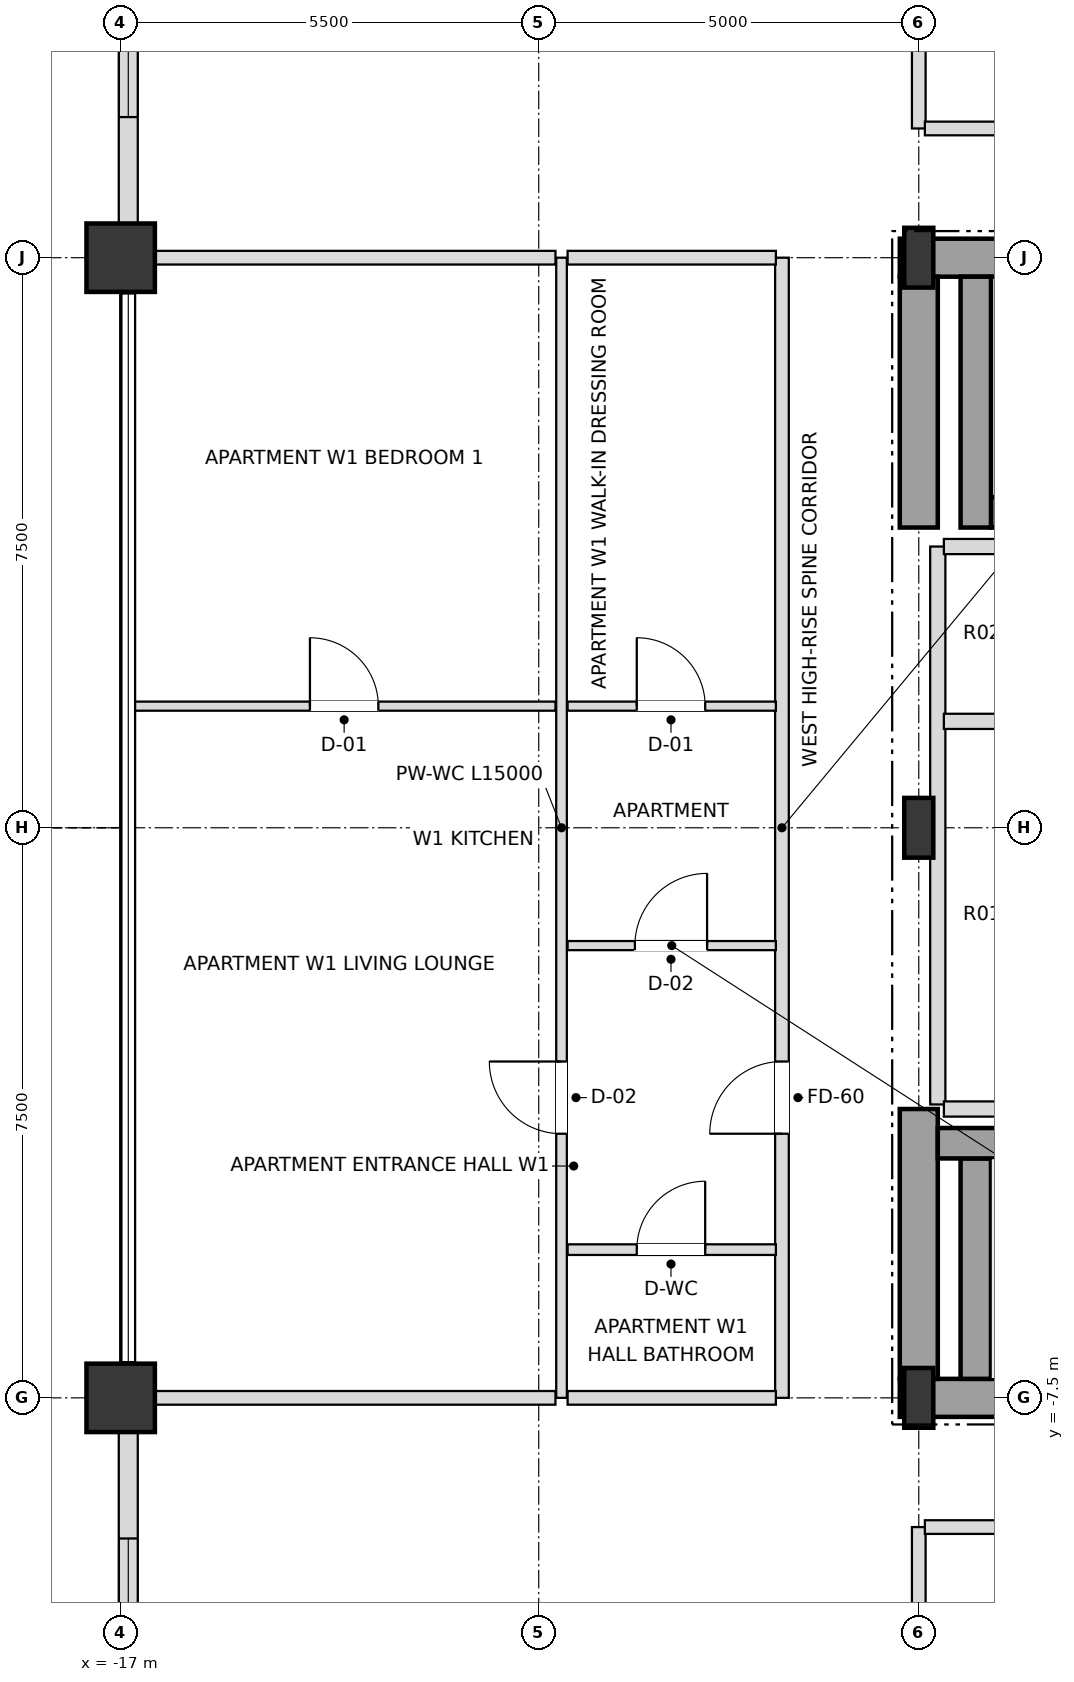
"""IFC4 building model, lengths in metres.
Left out: names, types, materials, properties, quantities, classifications, styles, units other than length and angle.
Written with IfcOpenShell. Run it as: python <this file> out.ifc"""

import sys

from ifc_helpers import new_model, si_unit, direction, frame, frame_2d, origin, origin_2d, place, context, subcontext, project, spatial, rectangle, i_section, extrude, element, fill, save


model = new_model("IFC4")
c1 = context("Model", 3, precision=1e-05, world=origin(), true_north=direction((0.0, 1.0)))
c2 = subcontext(c1, "Body", "Model", "MODEL_VIEW")
j1 = project(units=[si_unit("LENGTHUNIT", "METRE"), si_unit("PLANEANGLEUNIT", "RADIAN")], contexts=[c1])
p1 = place(None, origin())
s1 = spatial("IfcSite", under=j1, at=p1, CompositionType="ELEMENT")
p2 = place(p1, origin())
s2 = spatial("IfcBuilding", under=s1, at=p2, CompositionType="ELEMENT")
p3 = place(p2, frame((0.0, 0.0, 294.3)))
s3 = spatial("IfcBuildingStorey", under=s2, at=p3, CompositionType="ELEMENT", Elevation=294.3)
for number, where, z_axis, x_axis in (
    (1, (-6.5, -7.5, 0.0), (0.0, 0.0, 1.0), (1.0, 0.0, 0.0)),
    (2, (-6.5, 0.0, 0.0), (0.0, 0.0, 1.0), (1.0, 0.0, 0.0)),
    (3, (-6.5, 7.5, 0.0), (0.0, 0.0, 1.0), (1.0, 0.0, 0.0)),
):
    element("IfcColumn", number, at=place(p3, frame(where, z_axis=z_axis, x_axis=x_axis)), inside=s3, PredefinedType="COLUMN", context=c2, shape_type="SweptSolid", body=[
        extrude(i_section(OverallWidth=0.382, OverallDepth=0.786, WebThickness=0.02, FlangeThickness=0.033, at=origin_2d()), origin(), (0.0, 0.0, 1.0), 3.6),
    ])
for number, where, z_axis, x_axis in (
    (4, (-17.0, 7.5, 0.0), (0.0, 0.0, 1.0), (1.0, 0.0, 0.0)),
    (5, (-17.0, -7.5, 0.0), (0.0, 0.0, 1.0), (1.0, 0.0, 0.0)),
):
    element("IfcColumn", number, at=place(p3, frame(where, z_axis=z_axis, x_axis=x_axis)), inside=s3, PredefinedType="USERDEFINED", context=c2, shape_type="SweptSolid", body=[
        extrude(rectangle(XDim=0.9, YDim=0.9, at=origin_2d()), origin(), (0.0, 0.0, 1.0), 3.6),
    ])
p4 = place(p3, frame((-16.9, 12.555, 0.0), z_axis=(0.0, 0.0, 1.0), x_axis=(0.0, -1.0, 0.0)))
e6 = element("IfcWall", 6, at=p4, inside=s3, PredefinedType="SOLIDWALL", context=c2, shape_type="SweptSolid", body=[
    extrude(rectangle(XDim=4.61, YDim=0.25, at=frame_2d((2.305, 0.0))), origin(), (0.0, 0.0, 1.0), 2.748),
])
p5 = place(p4, frame((1.405, 0.0, 0.72)))
e7 = element("IfcOpeningElement", 7, at=p5, cuts=e6, PredefinedType="OPENING", context=c2, shape_type="SweptSolid", body=[
    extrude(rectangle(XDim=1.8, YDim=1.68, at=frame_2d((0.9, 0.84))), frame((0.0, 0.135, 0.0), z_axis=(0.0, -1.0, 0.0), x_axis=(1.0, 0.0, 0.0)), (0.0, 0.0, 1.0), 0.27),
])
p6 = place(p3, frame((-16.9, -7.945, 0.0), z_axis=(0.0, 0.0, 1.0), x_axis=(0.0, -1.0, 0.0)))
e8 = element("IfcWall", 8, at=p6, inside=s3, PredefinedType="SOLIDWALL", context=c2, shape_type="SweptSolid", body=[
    extrude(rectangle(XDim=4.61, YDim=0.25, at=frame_2d((2.305, 0.0))), origin(), (0.0, 0.0, 1.0), 2.748),
])
p7 = place(p6, frame((1.405, 0.0, 0.72)))
e9 = element("IfcOpeningElement", 9, at=p7, cuts=e8, PredefinedType="OPENING", context=c2, shape_type="SweptSolid", body=[
    extrude(rectangle(XDim=1.8, YDim=1.68, at=frame_2d((0.9, 0.84))), frame((0.0, 0.135, 0.0), z_axis=(0.0, -1.0, 0.0), x_axis=(1.0, 0.0, 0.0)), (0.0, 0.0, 1.0), 0.27),
])
p8 = place(p3, frame((-6.75, -7.5, 0.0), z_axis=(0.0, 0.0, 1.0), x_axis=(1.0, 0.0, 0.0)))
e10 = element("IfcWall", 10, at=p8, inside=s3, PredefinedType="SHEAR", context=c2, shape_type="SweptSolid", body=[
    extrude(rectangle(XDim=6.75, YDim=0.5, at=frame_2d((3.375, 0.0))), origin(), (0.0, 0.0, 1.0), 3.38),
])
p9 = place(p3, frame((-6.75, 7.5, 0.0), z_axis=(0.0, 0.0, 1.0), x_axis=(1.0, 0.0, 0.0)))
e11 = element("IfcWall", 11, at=p9, inside=s3, PredefinedType="SHEAR", context=c2, shape_type="SweptSolid", body=[
    extrude(rectangle(XDim=6.75, YDim=0.5, at=frame_2d((3.375, 0.0))), origin(), (0.0, 0.0, 1.0), 3.38),
])
p10 = place(p9, frame((1.65, 0.0, 0.0)))
e12 = element("IfcOpeningElement", 12, at=p10, cuts=e11, PredefinedType="OPENING", context=c2, shape_type="SweptSolid", body=[
    extrude(rectangle(XDim=1.05, YDim=2.15, at=frame_2d((0.525, 1.075))), frame((0.0, 0.26, 0.0), z_axis=(0.0, -1.0, 0.0), x_axis=(1.0, 0.0, 0.0)), (0.0, 0.0, 1.0), 0.52),
])
p11 = place(p3, frame((-6.5, -7.25, 0.0), z_axis=(0.0, 0.0, 1.0), x_axis=(0.0, 1.0, 0.0)))
e13 = element("IfcWall", 13, at=p11, inside=s3, PredefinedType="SHEAR", context=c2, shape_type="SweptSolid", body=[
    extrude(rectangle(XDim=3.55, YDim=0.5, at=frame_2d((1.775, 0.0))), origin(), (0.0, 0.0, 1.0), 3.38),
])
p12 = place(p3, frame((-6.5, 3.95, 0.0), z_axis=(0.0, 0.0, 1.0), x_axis=(0.0, 1.0, 0.0)))
e14 = element("IfcWall", 14, at=p12, inside=s3, PredefinedType="SHEAR", context=c2, shape_type="SweptSolid", body=[
    extrude(rectangle(XDim=3.3, YDim=0.5, at=frame_2d((1.65, 0.0))), origin(), (0.0, 0.0, 1.0), 3.38),
])
p13 = place(p3, frame((-5.75, -7.25, 0.0), z_axis=(0.0, 0.0, 1.0), x_axis=(0.0, 1.0, 0.0)))
e15 = element("IfcWall", 15, at=p13, inside=s3, PredefinedType="SHEAR", context=c2, shape_type="SweptSolid", body=[
    extrude(rectangle(XDim=2.9, YDim=0.4, at=frame_2d((1.45, 0.0))), origin(), (0.0, 0.0, 1.0), 3.38),
])
p14 = place(p3, frame((-6.25, -4.15, 0.0), z_axis=(0.0, 0.0, 1.0), x_axis=(1.0, 0.0, 0.0)))
e16 = element("IfcWall", 16, at=p14, inside=s3, PredefinedType="SHEAR", context=c2, shape_type="SweptSolid", body=[
    extrude(rectangle(XDim=7.78, YDim=0.4, at=frame_2d((3.89, 0.0))), origin(), (0.0, 0.0, 1.0), 3.38),
])
p15 = place(p3, frame((-5.55, 4.15, 0.0), z_axis=(0.0, 0.0, 1.0), x_axis=(1.0, 0.0, 0.0)))
e17 = element("IfcWall", 17, at=p15, inside=s3, PredefinedType="SHEAR", context=c2, shape_type="SweptSolid", body=[
    extrude(rectangle(XDim=7.08, YDim=0.4, at=frame_2d((3.54, 0.0))), origin(), (0.0, 0.0, 1.0), 3.38),
])
p16 = place(p3, frame((-5.75, 3.95, 0.0), z_axis=(0.0, 0.0, 1.0), x_axis=(0.0, 1.0, 0.0)))
e18 = element("IfcWall", 18, at=p16, inside=s3, PredefinedType="SHEAR", context=c2, shape_type="SweptSolid", body=[
    extrude(rectangle(XDim=3.3, YDim=0.4, at=frame_2d((1.65, 0.0))), origin(), (0.0, 0.0, 1.0), 3.38),
])
p17 = place(p3, frame((-11.2, -7.5, 0.0), z_axis=(0.0, 0.0, 1.0), x_axis=(0.0, 1.0, 0.0)))
e19 = element("IfcWall", 19, at=p17, inside=s3, PredefinedType="PARTITIONING", context=c2, shape_type="SweptSolid", body=[
    extrude(rectangle(XDim=15.0, YDim=0.14, at=frame_2d((7.5, 0.0))), origin(), (0.0, 0.0, 1.0), 3.38),
])
p18 = place(p17, frame((3.475, 0.0, 0.0)))
e20 = element("IfcOpeningElement", 20, at=p18, cuts=e19, PredefinedType="OPENING", context=c2, shape_type="SweptSolid", body=[
    extrude(rectangle(XDim=0.95, YDim=2.1, at=frame_2d((0.475, 1.05))), frame((0.0, 0.08, 0.0), z_axis=(0.0, -1.0, 0.0), x_axis=(1.0, 0.0, 0.0)), (0.0, 0.0, 1.0), 0.16),
])
p19 = place(p3, frame((-8.3, -7.5, 0.0), z_axis=(0.0, 0.0, 1.0), x_axis=(0.0, 1.0, 0.0)))
e21 = element("IfcWall", 21, at=p19, inside=s3, PredefinedType="PARTITIONING", context=c2, shape_type="SweptSolid", body=[
    extrude(rectangle(XDim=15.0, YDim=0.18, at=frame_2d((7.5, 0.0))), origin(), (0.0, 0.0, 1.0), 3.38),
])
p20 = place(p19, frame((3.475, 0.0, 0.0)))
e22 = element("IfcOpeningElement", 22, at=p20, cuts=e21, PredefinedType="OPENING", context=c2, shape_type="SweptSolid", body=[
    extrude(rectangle(XDim=0.95, YDim=2.15, at=frame_2d((0.475, 1.075))), frame((0.0, 0.1, 0.0), z_axis=(0.0, -1.0, 0.0), x_axis=(1.0, 0.0, 0.0)), (0.0, 0.0, 1.0), 0.2),
])
for number, where, z_axis, x_axis in (
    (23, (-6.5, -19.9, 0.0), (0.0, 0.0, 1.0), (0.0, 1.0, 0.0)),
    (24, (-6.5, 9.2, 0.0), (0.0, 0.0, 1.0), (0.0, 1.0, 0.0)),
):
    element("IfcWall", number, at=place(p3, frame(where, z_axis=z_axis, x_axis=x_axis)), inside=s3, PredefinedType="PARTITIONING", context=c2, shape_type="SweptSolid", body=[
        extrude(rectangle(XDim=10.7, YDim=0.18, at=frame_2d((5.35, 0.0))), origin(), (0.0, 0.0, 1.0), 2.826),
    ])
p21 = place(p3, frame((-6.25, -3.64, 0.0), z_axis=(0.0, 0.0, 1.0), x_axis=(0.0, 1.0, 0.0)))
e25 = element("IfcWall", 25, at=p21, inside=s3, PredefinedType="SOLIDWALL", context=c2, shape_type="SweptSolid", body=[
    extrude(rectangle(XDim=7.34, YDim=0.2, at=frame_2d((3.67, 0.0))), origin(), (0.0, 0.0, 1.0), 3.38),
])
p22 = place(p3, frame((-6.42, -9.2, 0.0), z_axis=(0.0, 0.0, 1.0), x_axis=(1.0, 0.0, 0.0)))
e26 = element("IfcWall", 26, at=p22, inside=s3, PredefinedType="PARTITIONING", context=c2, shape_type="SweptSolid", body=[
    extrude(rectangle(XDim=5.19, YDim=0.18, at=frame_2d((2.595, 0.0))), origin(), (0.0, 0.0, 1.0), 3.38),
])
p23 = place(p22, frame((2.135, 0.0, 0.0)))
e27 = element("IfcOpeningElement", 27, at=p23, cuts=e26, PredefinedType="OPENING", context=c2, shape_type="SweptSolid", body=[
    extrude(rectangle(XDim=0.95, YDim=2.15, at=frame_2d((0.475, 1.075))), frame((0.0, 0.1, 0.0), z_axis=(0.0, -1.0, 0.0), x_axis=(1.0, 0.0, 0.0)), (0.0, 0.0, 1.0), 0.2),
])
p24 = place(p3, frame((-16.9, -7.5, 0.0), z_axis=(0.0, 0.0, 1.0), x_axis=(1.0, 0.0, 0.0)))
e28 = element("IfcWall", 28, at=p24, inside=s3, PredefinedType="PARTITIONING", context=c2, shape_type="SweptSolid", body=[
    extrude(rectangle(XDim=5.62, YDim=0.18, at=frame_2d((2.81, 0.0))), origin(), (0.0, 0.0, 1.0), 2.826),
])
p25 = place(p3, frame((-11.12, -7.5, 0.0), z_axis=(0.0, 0.0, 1.0), x_axis=(1.0, 0.0, 0.0)))
e29 = element("IfcWall", 29, at=p25, inside=s3, PredefinedType="PARTITIONING", context=c2, shape_type="SweptSolid", body=[
    extrude(rectangle(XDim=2.74, YDim=0.18, at=frame_2d((1.37, 0.0))), origin(), (0.0, 0.0, 1.0), 2.826),
])
p26 = place(p3, frame((-11.12, -5.55, 0.0), z_axis=(0.0, 0.0, 1.0), x_axis=(1.0, 0.0, 0.0)))
e30 = element("IfcWall", 30, at=p26, inside=s3, PredefinedType="PARTITIONING", context=c2, shape_type="SweptSolid", body=[
    extrude(rectangle(XDim=2.74, YDim=0.14, at=frame_2d((1.37, 0.0))), origin(), (0.0, 0.0, 1.0), 3.38),
])
p27 = place(p26, frame((0.91, 0.0, 0.0)))
e31 = element("IfcOpeningElement", 31, at=p27, cuts=e30, PredefinedType="OPENING", context=c2, shape_type="SweptSolid", body=[
    extrude(rectangle(XDim=0.9, YDim=2.1, at=frame_2d((0.45, 1.05))), frame((0.0, 0.08, 0.0), z_axis=(0.0, -1.0, 0.0), x_axis=(1.0, 0.0, 0.0)), (0.0, 0.0, 1.0), 0.16),
])
p28 = place(p3, frame((-6.17, -3.7, 0.0), z_axis=(0.0, 0.0, 1.0), x_axis=(1.0, 0.0, 0.0)))
e32 = element("IfcWall", 32, at=p28, inside=s3, PredefinedType="SOLIDWALL", context=c2, shape_type="SweptSolid", body=[
    extrude(rectangle(XDim=1.94, YDim=0.2, at=frame_2d((0.97, 0.0))), origin(), (0.0, 0.0, 1.0), 3.38),
])
p29 = place(p3, frame((-11.12, -1.55, 0.0), z_axis=(0.0, 0.0, 1.0), x_axis=(1.0, 0.0, 0.0)))
e33 = element("IfcWall", 33, at=p29, inside=s3, PredefinedType="PARTITIONING", context=c2, shape_type="SweptSolid", body=[
    extrude(rectangle(XDim=2.74, YDim=0.12, at=frame_2d((1.37, 0.0))), origin(), (0.0, 0.0, 1.0), 3.38),
])
p30 = place(p29, frame((0.885, 0.0, 0.0)))
e34 = element("IfcOpeningElement", 34, at=p30, cuts=e33, PredefinedType="OPENING", context=c2, shape_type="SweptSolid", body=[
    extrude(rectangle(XDim=0.95, YDim=2.1, at=frame_2d((0.475, 1.05))), frame((0.0, 0.07, 0.0), z_axis=(0.0, -1.0, 0.0), x_axis=(1.0, 0.0, 0.0)), (0.0, 0.0, 1.0), 0.14),
])
p31 = place(p3, frame((-6.17, 1.4, 0.0), z_axis=(0.0, 0.0, 1.0), x_axis=(1.0, 0.0, 0.0)))
e35 = element("IfcWall", 35, at=p31, inside=s3, PredefinedType="SOLIDWALL", context=c2, shape_type="SweptSolid", body=[
    extrude(rectangle(XDim=1.94, YDim=0.2, at=frame_2d((0.97, 0.0))), origin(), (0.0, 0.0, 1.0), 3.38),
])
p32 = place(p3, frame((-16.82, 1.6, 0.0), z_axis=(0.0, 0.0, 1.0), x_axis=(1.0, 0.0, 0.0)))
e36 = element("IfcWall", 36, at=p32, inside=s3, PredefinedType="PARTITIONING", context=c2, shape_type="SweptSolid", body=[
    extrude(rectangle(XDim=5.54, YDim=0.12, at=frame_2d((2.77, 0.0))), origin(), (0.0, 0.0, 1.0), 3.018),
])
p33 = place(p32, frame((2.31, 0.0, 0.0)))
e37 = element("IfcOpeningElement", 37, at=p33, cuts=e36, PredefinedType="OPENING", context=c2, shape_type="SweptSolid", body=[
    extrude(rectangle(XDim=0.9, YDim=2.1, at=frame_2d((0.45, 1.05))), frame((0.0, 0.07, 0.0), z_axis=(0.0, -1.0, 0.0), x_axis=(1.0, 0.0, 0.0)), (0.0, 0.0, 1.0), 0.14),
])
p34 = place(p3, frame((-11.12, 1.6, 0.0), z_axis=(0.0, 0.0, 1.0), x_axis=(1.0, 0.0, 0.0)))
e38 = element("IfcWall", 38, at=p34, inside=s3, PredefinedType="PARTITIONING", context=c2, shape_type="SweptSolid", body=[
    extrude(rectangle(XDim=2.74, YDim=0.12, at=frame_2d((1.37, 0.0))), origin(), (0.0, 0.0, 1.0), 3.38),
])
p35 = place(p34, frame((0.91, 0.0, 0.0)))
e39 = element("IfcOpeningElement", 39, at=p35, cuts=e38, PredefinedType="OPENING", context=c2, shape_type="SweptSolid", body=[
    extrude(rectangle(XDim=0.9, YDim=2.1, at=frame_2d((0.45, 1.05))), frame((0.0, 0.07, 0.0), z_axis=(0.0, -1.0, 0.0), x_axis=(1.0, 0.0, 0.0)), (0.0, 0.0, 1.0), 0.14),
])
p36 = place(p3, frame((-6.17, 3.7, 0.0), z_axis=(0.0, 0.0, 1.0), x_axis=(1.0, 0.0, 0.0)))
e40 = element("IfcWall", 40, at=p36, inside=s3, PredefinedType="SOLIDWALL", context=c2, shape_type="SweptSolid", body=[
    extrude(rectangle(XDim=1.94, YDim=0.2, at=frame_2d((0.97, 0.0))), origin(), (0.0, 0.0, 1.0), 3.38),
])
p37 = place(p3, frame((-16.9, 7.5, 0.0), z_axis=(0.0, 0.0, 1.0), x_axis=(1.0, 0.0, 0.0)))
e41 = element("IfcWall", 41, at=p37, inside=s3, PredefinedType="PARTITIONING", context=c2, shape_type="SweptSolid", body=[
    extrude(rectangle(XDim=5.62, YDim=0.18, at=frame_2d((2.81, 0.0))), origin(), (0.0, 0.0, 1.0), 2.826),
])
p38 = place(p3, frame((-11.12, 7.5, 0.0), z_axis=(0.0, 0.0, 1.0), x_axis=(1.0, 0.0, 0.0)))
e42 = element("IfcWall", 42, at=p38, inside=s3, PredefinedType="PARTITIONING", context=c2, shape_type="SweptSolid", body=[
    extrude(rectangle(XDim=2.74, YDim=0.18, at=frame_2d((1.37, 0.0))), origin(), (0.0, 0.0, 1.0), 2.826),
])
p39 = place(p3, frame((-6.42, 9.2, 0.0), z_axis=(0.0, 0.0, 1.0), x_axis=(1.0, 0.0, 0.0)))
e43 = element("IfcWall", 43, at=p39, inside=s3, PredefinedType="PARTITIONING", context=c2, shape_type="SweptSolid", body=[
    extrude(rectangle(XDim=5.19, YDim=0.18, at=frame_2d((2.595, 0.0))), origin(), (0.0, 0.0, 1.0), 3.38),
])
p40 = place(p39, frame((2.135, 0.0, 0.0)))
e44 = element("IfcOpeningElement", 44, at=p40, cuts=e43, PredefinedType="OPENING", context=c2, shape_type="SweptSolid", body=[
    extrude(rectangle(XDim=0.95, YDim=2.15, at=frame_2d((0.475, 1.075))), frame((0.0, 0.1, 0.0), z_axis=(0.0, -1.0, 0.0), x_axis=(1.0, 0.0, 0.0)), (0.0, 0.0, 1.0), 0.2),
])
p41 = place(p5, origin())
e45 = element("IfcWindow", 45, at=p41, inside=s3, PartitioningType="SINGLE_PANEL", PredefinedType="WINDOW", context=c2, shape_type="SweptSolid", body=[
    extrude(rectangle(XDim=1.8, YDim=1.68, at=frame_2d((0.9, 0.84))), frame((0.0, 0.03, 0.0), z_axis=(0.0, -1.0, 0.0), x_axis=(1.0, 0.0, 0.0)), (0.0, 0.0, 1.0), 0.06),
])
fill(e7, e45)
p42 = place(p7, origin())
e46 = element("IfcWindow", 46, at=p42, inside=s3, PartitioningType="SINGLE_PANEL", PredefinedType="WINDOW", context=c2, shape_type="SweptSolid", body=[
    extrude(rectangle(XDim=1.8, YDim=1.68, at=frame_2d((0.9, 0.84))), frame((0.0, 0.03, 0.0), z_axis=(0.0, -1.0, 0.0), x_axis=(1.0, 0.0, 0.0)), (0.0, 0.0, 1.0), 0.06),
])
fill(e9, e46)
p43 = place(p27, origin())
e47 = element("IfcDoor", 47, at=p43, inside=s3, OperationType="SINGLE_SWING_RIGHT", PredefinedType="DOOR", context=c2, shape_type="SweptSolid", body=[
    extrude(rectangle(XDim=0.9, YDim=2.1, at=frame_2d((0.45, 1.05))), frame((0.0, 0.025, 0.0), z_axis=(0.0, -1.0, 0.0), x_axis=(1.0, 0.0, 0.0)), (0.0, 0.0, 1.0), 0.05),
])
fill(e31, e47)
p44 = place(p20, origin())
e48 = element("IfcDoor", 48, at=p44, inside=s3, OperationType="SINGLE_SWING_LEFT", PredefinedType="DOOR", context=c2, shape_type="SweptSolid", body=[
    extrude(rectangle(XDim=0.95, YDim=2.15, at=frame_2d((0.475, 1.075))), frame((0.0, 0.025, 0.0), z_axis=(0.0, -1.0, 0.0), x_axis=(1.0, 0.0, 0.0)), (0.0, 0.0, 1.0), 0.05),
])
fill(e22, e48)
p45 = place(p30, origin())
e49 = element("IfcDoor", 49, at=p45, inside=s3, OperationType="SINGLE_SWING_RIGHT", PredefinedType="DOOR", context=c2, shape_type="SweptSolid", body=[
    extrude(rectangle(XDim=0.95, YDim=2.1, at=frame_2d((0.475, 1.05))), frame((0.0, 0.025, 0.0), z_axis=(0.0, -1.0, 0.0), x_axis=(1.0, 0.0, 0.0)), (0.0, 0.0, 1.0), 0.05),
])
fill(e34, e49)
p46 = place(p35, origin())
e50 = element("IfcDoor", 50, at=p46, inside=s3, OperationType="SINGLE_SWING_LEFT", PredefinedType="DOOR", context=c2, shape_type="SweptSolid", body=[
    extrude(rectangle(XDim=0.9, YDim=2.1, at=frame_2d((0.45, 1.05))), frame((0.0, 0.025, 0.0), z_axis=(0.0, -1.0, 0.0), x_axis=(1.0, 0.0, 0.0)), (0.0, 0.0, 1.0), 0.05),
])
fill(e39, e50)
p47 = place(p18, origin())
e51 = element("IfcDoor", 51, at=p47, inside=s3, OperationType="SINGLE_SWING_RIGHT", PredefinedType="DOOR", context=c2, shape_type="SweptSolid", body=[
    extrude(rectangle(XDim=0.95, YDim=2.1, at=frame_2d((0.475, 1.05))), frame((0.0, 0.025, 0.0), z_axis=(0.0, -1.0, 0.0), x_axis=(1.0, 0.0, 0.0)), (0.0, 0.0, 1.0), 0.05),
])
fill(e20, e51)
p48 = place(p33, origin())
e52 = element("IfcDoor", 52, at=p48, inside=s3, OperationType="SINGLE_SWING_LEFT", PredefinedType="DOOR", context=c2, shape_type="SweptSolid", body=[
    extrude(rectangle(XDim=0.9, YDim=2.1, at=frame_2d((0.45, 1.05))), frame((0.0, 0.025, 0.0), z_axis=(0.0, -1.0, 0.0), x_axis=(1.0, 0.0, 0.0)), (0.0, 0.0, 1.0), 0.05),
])
fill(e37, e52)
save(model, sys.argv[1])
